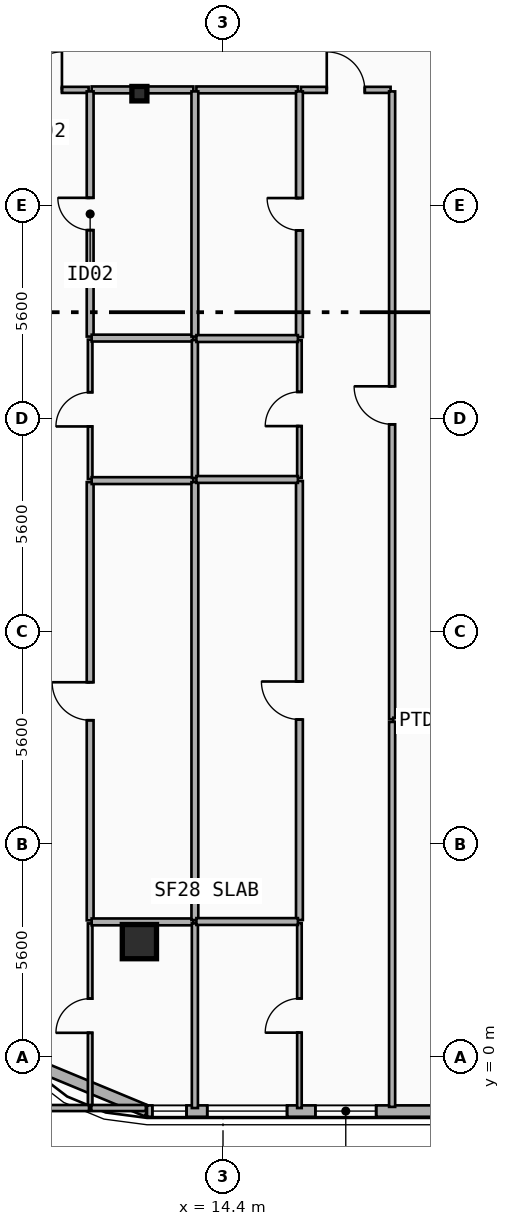
"""IFC4 building model, lengths in metres.
Left out: names, types, materials, properties, quantities, classifications, styles, units other than length and angle.
Written with IfcOpenShell. Run it as: python <this file> out.ifc"""

import sys

from ifc_helpers import new_model, si_unit, direction, frame, frame_2d, origin, origin_2d, place, context, subcontext, project, spatial, rectangle, i_section, extrude, element, fill, save


model = new_model("IFC4")
c1 = context("Model", 3, precision=1e-05, world=origin(), true_north=direction((0.0, 1.0)))
c2 = subcontext(c1, "Body", "Model", "MODEL_VIEW")
j1 = project(units=[si_unit("LENGTHUNIT", "METRE"), si_unit("PLANEANGLEUNIT", "RADIAN")], contexts=[c1])
p1 = place(None, origin())
s1 = spatial("IfcSite", under=j1, at=p1, CompositionType="ELEMENT")
p2 = place(p1, origin())
s2 = spatial("IfcBuilding", under=s1, at=p2, CompositionType="ELEMENT")
p3 = place(p2, frame((0.0, 0.0, 254.7)))
s3 = spatial("IfcBuildingStorey", under=s2, at=p3, CompositionType="ELEMENT", Elevation=254.7)
p4 = place(p3, frame((12.2, 25.35, 0.0), z_axis=(0.0, 0.0, 1.0), x_axis=(1.0, 0.0, 0.0)))
e1 = element("IfcColumn", 1, at=p4, inside=s3, PredefinedType="COLUMN", context=c2, shape_type="SweptSolid", body=[
    extrude(i_section(OverallWidth=0.395, OverallDepth=0.38, WebThickness=0.019, FlangeThickness=0.03, FilletRadius=0.015, at=origin_2d()), origin(), (0.0, 0.0, 1.0), 3.7),
])
p5 = place(p3, frame((12.2, 3.147, 0.0), z_axis=(0.0, -0.090292812226, 0.995915261486), x_axis=(1.0, 0.0, 0.0)))
e2 = element("IfcColumn", 2, at=p5, inside=s3, PredefinedType="COLUMN", context=c2, shape_type="SweptSolid", body=[
    extrude(rectangle(XDim=0.9, YDim=0.9, at=origin_2d()), origin(), (0.0, 0.0, 1.0), 3.715),
])
p6 = place(p3, frame((12.4, -1.42, 0.0), z_axis=(0.0, 0.0, 1.0), x_axis=(-0.92389884758, 0.382636798336, 0.0)))
e3 = element("IfcWall", 3, at=p6, inside=s3, PredefinedType="SOLIDWALL", context=c2, shape_type="SweptSolid", body=[
    extrude(rectangle(XDim=3.077, YDim=0.3, at=frame_2d((1.538, 0.0))), origin(), (0.0, 0.0, 1.0), 3.42),
])
p7 = place(p3, frame((45.2, -1.42, 0.0), z_axis=(0.0, 0.0, 1.0), x_axis=(-1.0, 0.0, 0.0)))
e4 = element("IfcWall", 4, at=p7, inside=s3, PredefinedType="SOLIDWALL", context=c2, shape_type="SweptSolid", body=[
    extrude(rectangle(XDim=32.8, YDim=0.3, at=frame_2d((16.4, 0.0))), origin(), (0.0, 0.0, 1.0), 3.42),
])
p8 = place(p7, frame((26.77, 0.0, 0.75)))
e5 = element("IfcOpeningElement", 5, at=p8, cuts=e4, PredefinedType="OPENING", context=c2, shape_type="SweptSolid", body=[
    extrude(rectangle(XDim=1.6, YDim=1.95, at=frame_2d((0.8, 0.975))), frame((0.0, 0.16, 0.0), z_axis=(0.0, -1.0, 0.0), x_axis=(1.0, 0.0, 0.0)), (0.0, 0.0, 1.0), 0.32),
])
p9 = place(p7, frame((29.115, 0.0, 0.75)))
e6 = element("IfcOpeningElement", 6, at=p9, cuts=e4, PredefinedType="OPENING", context=c2, shape_type="SweptSolid", body=[
    extrude(rectangle(XDim=2.1, YDim=2.1, at=frame_2d((1.05, 1.05))), frame((0.0, 0.16, 0.0), z_axis=(0.0, -1.0, 0.0), x_axis=(1.0, 0.0, 0.0)), (0.0, 0.0, 1.0), 0.32),
])
p10 = place(p7, frame((15.75, 0.0, 0.75)))
e7 = element("IfcOpeningElement", 7, at=p10, cuts=e4, PredefinedType="OPENING", context=c2, shape_type="SweptSolid", body=[
    extrude(rectangle(XDim=2.1, YDim=2.1, at=frame_2d((1.05, 1.05))), frame((0.0, 0.16, 0.0), z_axis=(0.0, -1.0, 0.0), x_axis=(1.0, 0.0, 0.0)), (0.0, 0.0, 1.0), 0.32),
])
p11 = place(p7, frame((4.681, 0.0, 0.8)))
e8 = element("IfcOpeningElement", 8, at=p11, cuts=e4, PredefinedType="OPENING", context=c2, shape_type="SweptSolid", body=[
    extrude(rectangle(XDim=1.8, YDim=1.8, at=frame_2d((0.9, 0.9))), frame((0.0, 0.16, 0.0), z_axis=(0.0, -1.0, 0.0), x_axis=(1.0, 0.0, 0.0)), (0.0, 0.0, 1.0), 0.32),
])
p12 = place(p7, frame((1.831, 0.0, 0.75)))
e9 = element("IfcOpeningElement", 9, at=p12, cuts=e4, PredefinedType="OPENING", context=c2, shape_type="SweptSolid", body=[
    extrude(rectangle(XDim=2.1, YDim=2.1, at=frame_2d((1.05, 1.05))), frame((0.0, 0.16, 0.0), z_axis=(0.0, -1.0, 0.0), x_axis=(1.0, 0.0, 0.0)), (0.0, 0.0, 1.0), 0.32),
])
p13 = place(p7, frame((0.2, 0.0, 0.9)))
e10 = element("IfcOpeningElement", 10, at=p13, cuts=e4, PredefinedType="OPENING", context=c2, shape_type="SweptSolid", body=[
    extrude(rectangle(XDim=0.9, YDim=1.05, at=frame_2d((0.45, 0.525))), frame((0.0, 0.16, 0.0), z_axis=(0.0, -1.0, 0.0), x_axis=(1.0, 0.0, 0.0)), (0.0, 0.0, 1.0), 0.32),
])
p14 = place(p7, frame((31.76, 0.0, 0.9)))
e11 = element("IfcOpeningElement", 11, at=p14, cuts=e4, PredefinedType="OPENING", context=c2, shape_type="SweptSolid", body=[
    extrude(rectangle(XDim=0.9, YDim=1.05, at=frame_2d((0.45, 0.525))), frame((0.0, 0.16, 0.0), z_axis=(0.0, -1.0, 0.0), x_axis=(1.0, 0.0, 0.0)), (0.0, 0.0, 1.0), 0.32),
])
p15 = place(p3, frame((8.46, 25.45, 0.0), z_axis=(0.0, 0.0, 1.0), x_axis=(1.0, 0.0, 0.0)))
e12 = element("IfcWall", 12, at=p15, inside=s3, PredefinedType="PARTITIONING", context=c2, shape_type="SweptSolid", body=[
    extrude(rectangle(XDim=2.404, YDim=0.16, at=frame_2d((1.202, 0.0))), origin(), (0.0, 0.0, 1.0), 3.42),
])
p16 = place(p15, frame((0.702, 0.0, 0.0)))
e13 = element("IfcOpeningElement", 13, at=p16, cuts=e12, PredefinedType="OPENING", context=c2, shape_type="SweptSolid", body=[
    extrude(rectangle(XDim=1.0, YDim=2.15, at=frame_2d((0.5, 1.075))), frame((0.0, 0.09, 0.0), z_axis=(0.0, -1.0, 0.0), x_axis=(1.0, 0.0, 0.0)), (0.0, 0.0, 1.0), 0.18),
])
p17 = place(p3, frame((10.944, 25.45, 0.0), z_axis=(0.0, 0.0, 1.0), x_axis=(1.0, 0.0, 0.0)))
e14 = element("IfcWall", 14, at=p17, inside=s3, PredefinedType="PLUMBINGWALL", context=c2, shape_type="SweptSolid", body=[
    extrude(rectangle(XDim=2.676, YDim=0.18, at=frame_2d((1.338, 0.0))), origin(), (0.0, 0.0, 1.0), 2.7),
])
p18 = place(p3, frame((16.451, 25.45, 0.0), z_axis=(0.0, 0.0, 1.0), x_axis=(1.0, 0.0, 0.0)))
e15 = element("IfcWall", 15, at=p18, inside=s3, PredefinedType="PARTITIONING", context=c2, shape_type="SweptSolid", body=[
    extrude(rectangle(XDim=2.359, YDim=0.16, at=frame_2d((1.18, 0.0))), origin(), (0.0, 0.0, 1.0), 3.42),
])
p19 = place(p18, frame((0.679, 0.0, 0.0)))
e16 = element("IfcOpeningElement", 16, at=p19, cuts=e15, PredefinedType="OPENING", context=c2, shape_type="SweptSolid", body=[
    extrude(rectangle(XDim=1.0, YDim=2.15, at=frame_2d((0.5, 1.075))), frame((0.0, 0.09, 0.0), z_axis=(0.0, -1.0, 0.0), x_axis=(1.0, 0.0, 0.0)), (0.0, 0.0, 1.0), 0.18),
])
p20 = place(p3, frame((13.7, 25.45, 0.0), z_axis=(0.0, 0.0, 1.0), x_axis=(1.0, 0.0, 0.0)))
e17 = element("IfcWall", 17, at=p20, inside=s3, PredefinedType="PLUMBINGWALL", context=c2, shape_type="SweptSolid", body=[
    extrude(rectangle(XDim=2.671, YDim=0.18, at=frame_2d((1.335, 0.0))), origin(), (0.0, 0.0, 1.0), 3.42),
])
p21 = place(p3, frame((18.85, 8.89, 0.0), z_axis=(0.0, 0.0, 1.0), x_axis=(0.0, 1.0, 0.0)))
e18 = element("IfcWall", 18, at=p21, inside=s3, PredefinedType="PARTITIONING", context=c2, shape_type="SweptSolid", body=[
    extrude(rectangle(XDim=16.52, YDim=0.16, at=frame_2d((8.26, 0.0))), origin(), (0.0, 0.0, 1.0), 2.9),
])
p22 = place(p21, frame((7.76, 0.0, 0.0)))
e19 = element("IfcOpeningElement", 19, at=p22, cuts=e18, PredefinedType="OPENING", context=c2, shape_type="SweptSolid", body=[
    extrude(rectangle(XDim=1.0, YDim=2.15, at=frame_2d((0.5, 1.075))), frame((0.0, 0.09, 0.0), z_axis=(0.0, -1.0, 0.0), x_axis=(1.0, 0.0, 0.0)), (0.0, 0.0, 1.0), 0.18),
])
p23 = place(p3, frame((10.904, -1.34, 0.0), z_axis=(0.0, 0.0, 1.0), x_axis=(0.0, 1.0, 0.0)))
e20 = element("IfcWall", 20, at=p23, inside=s3, PredefinedType="PARTITIONING", context=c2, shape_type="SweptSolid", body=[
    extrude(rectangle(XDim=4.858, YDim=0.12, at=frame_2d((2.429, 0.0))), origin(), (0.0, 0.0, 1.0), 3.42),
])
p24 = place(p23, frame((1.979, 0.0, 0.0)))
e21 = element("IfcOpeningElement", 21, at=p24, cuts=e20, PredefinedType="OPENING", context=c2, shape_type="SweptSolid", body=[
    extrude(rectangle(XDim=0.9, YDim=2.1, at=frame_2d((0.45, 1.05))), frame((0.0, 0.07, 0.0), z_axis=(0.0, -1.0, 0.0), x_axis=(1.0, 0.0, 0.0)), (0.0, 0.0, 1.0), 0.14),
])
p25 = place(p3, frame((10.904, 3.598, 0.0), z_axis=(0.0, 0.0, 1.0), x_axis=(0.0, 1.0, 0.0)))
e22 = element("IfcWall", 22, at=p25, inside=s3, PredefinedType="PLUMBINGWALL", context=c2, shape_type="SweptSolid", body=[
    extrude(rectangle(XDim=11.531, YDim=0.18, at=frame_2d((5.766, 0.0))), origin(), (0.0, 0.0, 1.0), 3.42),
])
p26 = place(p25, frame((5.265, 0.0, 0.0)))
e23 = element("IfcOpeningElement", 23, at=p26, cuts=e22, PredefinedType="OPENING", context=c2, shape_type="SweptSolid", body=[
    extrude(rectangle(XDim=1.0, YDim=2.15, at=frame_2d((0.5, 1.075))), frame((0.0, 0.1, 0.0), z_axis=(0.0, -1.0, 0.0), x_axis=(1.0, 0.0, 0.0)), (0.0, 0.0, 1.0), 0.2),
])
p27 = place(p3, frame((10.904, 15.209, 0.0), z_axis=(0.0, 0.0, 1.0), x_axis=(0.0, 1.0, 0.0)))
e24 = element("IfcWall", 24, at=p27, inside=s3, PredefinedType="PARTITIONING", context=c2, shape_type="SweptSolid", body=[
    extrude(rectangle(XDim=3.67, YDim=0.12, at=frame_2d((1.835, 0.0))), origin(), (0.0, 0.0, 1.0), 3.42),
])
p28 = place(p27, frame((1.385, 0.0, 0.0)))
e25 = element("IfcOpeningElement", 25, at=p28, cuts=e24, PredefinedType="OPENING", context=c2, shape_type="SweptSolid", body=[
    extrude(rectangle(XDim=0.9, YDim=2.1, at=frame_2d((0.45, 1.05))), frame((0.0, 0.07, 0.0), z_axis=(0.0, -1.0, 0.0), x_axis=(1.0, 0.0, 0.0)), (0.0, 0.0, 1.0), 0.14),
])
p29 = place(p3, frame((10.904, 18.959, 0.0), z_axis=(0.0, 0.0, 1.0), x_axis=(0.0, 1.0, 0.0)))
e26 = element("IfcWall", 26, at=p29, inside=s3, PredefinedType="PLUMBINGWALL", context=c2, shape_type="SweptSolid", body=[
    extrude(rectangle(XDim=6.451, YDim=0.18, at=frame_2d((3.226, 0.0))), origin(), (0.0, 0.0, 1.0), 2.9),
])
p30 = place(p29, frame((2.801, 0.0, 0.0)))
e27 = element("IfcOpeningElement", 27, at=p30, cuts=e26, PredefinedType="OPENING", context=c2, shape_type="SweptSolid", body=[
    extrude(rectangle(XDim=0.85, YDim=2.1, at=frame_2d((0.425, 1.05))), frame((0.0, 0.1, 0.0), z_axis=(0.0, -1.0, 0.0), x_axis=(1.0, 0.0, 0.0)), (0.0, 0.0, 1.0), 0.2),
])
p31 = place(p3, frame((10.944, 3.558, 0.0), z_axis=(0.0, 0.0, 1.0), x_axis=(1.0, 0.0, 0.0)))
e28 = element("IfcWall", 28, at=p31, inside=s3, PredefinedType="PLUMBINGWALL", context=c2, shape_type="SweptSolid", body=[
    extrude(rectangle(XDim=2.676, YDim=0.18, at=frame_2d((1.338, 0.0))), origin(), (0.0, 0.0, 1.0), 2.7),
])
p32 = place(p3, frame((13.66, -1.34, 0.0), z_axis=(0.0, 0.0, 1.0), x_axis=(0.0, 1.0, 0.0)))
e29 = element("IfcWall", 29, at=p32, inside=s3, PredefinedType="PARTITIONING", context=c2, shape_type="SweptSolid", body=[
    extrude(rectangle(XDim=4.858, YDim=0.16, at=frame_2d((2.429, 0.0))), origin(), (0.0, 0.0, 1.0), 3.08),
])
p33 = place(p3, frame((10.944, 15.169, 0.0), z_axis=(0.0, 0.0, 1.0), x_axis=(1.0, 0.0, 0.0)))
e30 = element("IfcWall", 30, at=p33, inside=s3, PredefinedType="PLUMBINGWALL", context=c2, shape_type="SweptSolid", body=[
    extrude(rectangle(XDim=2.676, YDim=0.18, at=frame_2d((1.338, 0.0))), origin(), (0.0, 0.0, 1.0), 2.7),
])
p34 = place(p3, frame((13.66, 3.607, 0.0), z_axis=(0.0, 0.0, 1.0), x_axis=(0.0, 1.0, 0.0)))
e31 = element("IfcWall", 31, at=p34, inside=s3, PredefinedType="PLUMBINGWALL", context=c2, shape_type="SweptSolid", body=[
    extrude(rectangle(XDim=11.522, YDim=0.18, at=frame_2d((5.761, 0.0))), origin(), (0.0, 0.0, 1.0), 2.9),
])
p35 = place(p3, frame((10.944, 18.919, 0.0), z_axis=(0.0, 0.0, 1.0), x_axis=(1.0, 0.0, 0.0)))
e32 = element("IfcWall", 32, at=p35, inside=s3, PredefinedType="PLUMBINGWALL", context=c2, shape_type="SweptSolid", body=[
    extrude(rectangle(XDim=2.676, YDim=0.18, at=frame_2d((1.338, 0.0))), origin(), (0.0, 0.0, 1.0), 2.7),
])
p36 = place(p3, frame((13.66, 15.239, 0.0), z_axis=(0.0, 0.0, 1.0), x_axis=(0.0, 1.0, 0.0)))
e33 = element("IfcWall", 33, at=p36, inside=s3, PredefinedType="PARTITIONING", context=c2, shape_type="SweptSolid", body=[
    extrude(rectangle(XDim=3.628, YDim=0.16, at=frame_2d((1.814, 0.0))), origin(), (0.0, 0.0, 1.0), 2.9),
])
p37 = place(p3, frame((13.66, 18.959, 0.0), z_axis=(0.0, 0.0, 1.0), x_axis=(0.0, 1.0, 0.0)))
e34 = element("IfcWall", 34, at=p37, inside=s3, PredefinedType="PLUMBINGWALL", context=c2, shape_type="SweptSolid", body=[
    extrude(rectangle(XDim=6.451, YDim=0.18, at=frame_2d((3.226, 0.0))), origin(), (0.0, 0.0, 1.0), 2.9),
])
p38 = place(p3, frame((16.411, -1.34, 0.0), z_axis=(0.0, 0.0, 1.0), x_axis=(0.0, 1.0, 0.0)))
e35 = element("IfcWall", 35, at=p38, inside=s3, PredefinedType="PARTITIONING", context=c2, shape_type="SweptSolid", body=[
    extrude(rectangle(XDim=4.867, YDim=0.12, at=frame_2d((2.434, 0.0))), origin(), (0.0, 0.0, 1.0), 3.08),
])
p39 = place(p38, frame((1.983, 0.0, 0.0)))
e36 = element("IfcOpeningElement", 36, at=p39, cuts=e35, PredefinedType="OPENING", context=c2, shape_type="SweptSolid", body=[
    extrude(rectangle(XDim=0.9, YDim=2.1, at=frame_2d((0.45, 1.05))), frame((0.0, 0.07, 0.0), z_axis=(0.0, -1.0, 0.0), x_axis=(1.0, 0.0, 0.0)), (0.0, 0.0, 1.0), 0.14),
])
p40 = place(p3, frame((16.411, 3.607, 0.0), z_axis=(0.0, 0.0, 1.0), x_axis=(0.0, 1.0, 0.0)))
e37 = element("IfcWall", 37, at=p40, inside=s3, PredefinedType="PLUMBINGWALL", context=c2, shape_type="SweptSolid", body=[
    extrude(rectangle(XDim=11.552, YDim=0.18, at=frame_2d((5.776, 0.0))), origin(), (0.0, 0.0, 1.0), 2.9),
])
p41 = place(p40, frame((5.276, 0.0, 0.0)))
e38 = element("IfcOpeningElement", 38, at=p41, cuts=e37, PredefinedType="OPENING", context=c2, shape_type="SweptSolid", body=[
    extrude(rectangle(XDim=1.0, YDim=2.15, at=frame_2d((0.5, 1.075))), frame((0.0, 0.1, 0.0), z_axis=(0.0, -1.0, 0.0), x_axis=(1.0, 0.0, 0.0)), (0.0, 0.0, 1.0), 0.2),
])
p42 = place(p3, frame((16.411, 15.239, 0.0), z_axis=(0.0, 0.0, 1.0), x_axis=(0.0, 1.0, 0.0)))
e39 = element("IfcWall", 39, at=p42, inside=s3, PredefinedType="PARTITIONING", context=c2, shape_type="SweptSolid", body=[
    extrude(rectangle(XDim=3.628, YDim=0.12, at=frame_2d((1.814, 0.0))), origin(), (0.0, 0.0, 1.0), 2.9),
])
p43 = place(p42, frame((1.364, 0.0, 0.0)))
e40 = element("IfcOpeningElement", 40, at=p43, cuts=e39, PredefinedType="OPENING", context=c2, shape_type="SweptSolid", body=[
    extrude(rectangle(XDim=0.9, YDim=2.1, at=frame_2d((0.45, 1.05))), frame((0.0, 0.07, 0.0), z_axis=(0.0, -1.0, 0.0), x_axis=(1.0, 0.0, 0.0)), (0.0, 0.0, 1.0), 0.14),
])
p44 = place(p3, frame((16.411, 18.947, 0.0), z_axis=(0.0, 0.0, 1.0), x_axis=(0.0, 1.0, 0.0)))
e41 = element("IfcWall", 41, at=p44, inside=s3, PredefinedType="PLUMBINGWALL", context=c2, shape_type="SweptSolid", body=[
    extrude(rectangle(XDim=6.463, YDim=0.18, at=frame_2d((3.231, 0.0))), origin(), (0.0, 0.0, 1.0), 2.9),
])
p45 = place(p44, frame((2.806, 0.0, 0.0)))
e42 = element("IfcOpeningElement", 42, at=p45, cuts=e41, PredefinedType="OPENING", context=c2, shape_type="SweptSolid", body=[
    extrude(rectangle(XDim=0.85, YDim=2.1, at=frame_2d((0.425, 1.05))), frame((0.0, 0.1, 0.0), z_axis=(0.0, -1.0, 0.0), x_axis=(1.0, 0.0, 0.0)), (0.0, 0.0, 1.0), 0.2),
])
p46 = place(p3, frame((13.7, 3.567, 0.0), z_axis=(0.0, 0.0, 1.0), x_axis=(1.0, 0.0, 0.0)))
e43 = element("IfcWall", 43, at=p46, inside=s3, PredefinedType="PLUMBINGWALL", context=c2, shape_type="SweptSolid", body=[
    extrude(rectangle(XDim=2.671, YDim=0.18, at=frame_2d((1.335, 0.0))), origin(), (0.0, 0.0, 1.0), 3.42),
])
p47 = place(p3, frame((13.7, 15.199, 0.0), z_axis=(0.0, 0.0, 1.0), x_axis=(1.0, 0.0, 0.0)))
e44 = element("IfcWall", 44, at=p47, inside=s3, PredefinedType="PLUMBINGWALL", context=c2, shape_type="SweptSolid", body=[
    extrude(rectangle(XDim=2.671, YDim=0.18, at=frame_2d((1.335, 0.0))), origin(), (0.0, 0.0, 1.0), 2.9),
])
p48 = place(p3, frame((13.7, 18.907, 0.0), z_axis=(0.0, 0.0, 1.0), x_axis=(1.0, 0.0, 0.0)))
e45 = element("IfcWall", 45, at=p48, inside=s3, PredefinedType="PLUMBINGWALL", context=c2, shape_type="SweptSolid", body=[
    extrude(rectangle(XDim=2.671, YDim=0.18, at=frame_2d((1.335, 0.0))), origin(), (0.0, 0.0, 1.0), 2.91),
])
p49 = place(p3, frame((18.88, 8.85, 0.0), z_axis=(0.0, 0.0, 1.0), x_axis=(1.0, 0.0, 0.0)))
e46 = element("IfcWall", 46, at=p49, inside=s3, PredefinedType="PARTITIONING", context=c2, shape_type="SweptSolid", body=[
    extrude(rectangle(XDim=1.54, YDim=0.16, at=frame_2d((0.77, 0.0))), origin(), (0.0, 0.0, 1.0), 3.42),
])
p50 = place(p3, frame((8.49, -1.34, 0.0), z_axis=(0.0, 0.0, 1.0), x_axis=(1.0, 0.0, 0.0)))
e47 = element("IfcWall", 47, at=p50, inside=s3, PredefinedType="PARTITIONING", context=c2, shape_type="SweptSolid", body=[
    extrude(rectangle(XDim=2.384, YDim=0.16, at=frame_2d((1.192, 0.0))), origin(), (0.0, 0.0, 1.0), 3.42),
])
p51 = place(p3, frame((10.934, -1.34, 0.0), z_axis=(0.0, 0.0, 1.0), x_axis=(1.0, 0.0, 0.0)))
e48 = element("IfcWall", 48, at=p51, inside=s3, PredefinedType="PARTITIONING", context=c2, shape_type="SweptSolid", body=[
    extrude(rectangle(XDim=1.436, YDim=0.16, at=frame_2d((0.718, 0.0))), origin(), (0.0, 0.0, 1.0), 3.42),
])
p52 = place(p3, frame((18.85, -1.31, 0.0), z_axis=(0.0, 0.0, 1.0), x_axis=(0.0, 1.0, 0.0)))
e49 = element("IfcWall", 49, at=p52, inside=s3, PredefinedType="PARTITIONING", context=c2, shape_type="SweptSolid", body=[
    extrude(rectangle(XDim=10.13, YDim=0.16, at=frame_2d((5.065, 0.0))), origin(), (0.0, 0.0, 1.0), 2.9),
])
p53 = place(p8, origin())
e50 = element("IfcWindow", 50, at=p53, inside=s3, PartitioningType="SINGLE_PANEL", PredefinedType="WINDOW", context=c2, shape_type="SweptSolid", body=[
    extrude(rectangle(XDim=1.6, YDim=1.95, at=frame_2d((0.8, 0.975))), frame((0.0, 0.03, 0.0), z_axis=(0.0, -1.0, 0.0), x_axis=(1.0, 0.0, 0.0)), (0.0, 0.0, 1.0), 0.06),
])
fill(e5, e50)
p54 = place(p9, origin())
e51 = element("IfcWindow", 51, at=p54, inside=s3, PartitioningType="SINGLE_PANEL", PredefinedType="WINDOW", context=c2, shape_type="SweptSolid", body=[
    extrude(rectangle(XDim=2.1, YDim=2.1, at=frame_2d((1.05, 1.05))), frame((0.0, 0.03, 0.0), z_axis=(0.0, -1.0, 0.0), x_axis=(1.0, 0.0, 0.0)), (0.0, 0.0, 1.0), 0.06),
])
fill(e6, e51)
p55 = place(p14, origin())
e52 = element("IfcWindow", 52, at=p55, inside=s3, PartitioningType="SINGLE_PANEL", PredefinedType="WINDOW", context=c2, shape_type="SweptSolid", body=[
    extrude(rectangle(XDim=0.9, YDim=1.05, at=frame_2d((0.45, 0.525))), frame((0.0, 0.03, 0.0), z_axis=(0.0, -1.0, 0.0), x_axis=(1.0, 0.0, 0.0)), (0.0, 0.0, 1.0), 0.06),
])
fill(e11, e52)
p56 = place(p16, origin())
e53 = element("IfcDoor", 53, at=p56, inside=s3, OperationType="SINGLE_SWING_RIGHT", PredefinedType="DOOR", context=c2, shape_type="SweptSolid", body=[
    extrude(rectangle(XDim=1.0, YDim=2.15, at=frame_2d((0.5, 1.075))), frame((0.0, 0.025, 0.0), z_axis=(0.0, -1.0, 0.0), x_axis=(1.0, 0.0, 0.0)), (0.0, 0.0, 1.0), 0.05),
])
fill(e13, e53)
p57 = place(p19, origin())
e54 = element("IfcDoor", 54, at=p57, inside=s3, OperationType="SINGLE_SWING_LEFT", PredefinedType="DOOR", context=c2, shape_type="SweptSolid", body=[
    extrude(rectangle(XDim=1.0, YDim=2.15, at=frame_2d((0.5, 1.075))), frame((0.0, 0.025, 0.0), z_axis=(0.0, -1.0, 0.0), x_axis=(1.0, 0.0, 0.0)), (0.0, 0.0, 1.0), 0.05),
])
fill(e16, e54)
p58 = place(p22, origin())
e55 = element("IfcDoor", 55, at=p58, inside=s3, OperationType="SINGLE_SWING_RIGHT", PredefinedType="DOOR", context=c2, shape_type="SweptSolid", body=[
    extrude(rectangle(XDim=1.0, YDim=2.15, at=frame_2d((0.5, 1.075))), frame((0.0, 0.025, 0.0), z_axis=(0.0, -1.0, 0.0), x_axis=(1.0, 0.0, 0.0)), (0.0, 0.0, 1.0), 0.05),
])
fill(e19, e55)
p59 = place(p24, origin())
e56 = element("IfcDoor", 56, at=p59, inside=s3, OperationType="SINGLE_SWING_LEFT", PredefinedType="DOOR", context=c2, shape_type="SweptSolid", body=[
    extrude(rectangle(XDim=0.9, YDim=2.1, at=frame_2d((0.45, 1.05))), frame((0.0, 0.025, 0.0), z_axis=(0.0, -1.0, 0.0), x_axis=(1.0, 0.0, 0.0)), (0.0, 0.0, 1.0), 0.05),
])
fill(e21, e56)
p60 = place(p26, origin())
e57 = element("IfcDoor", 57, at=p60, inside=s3, OperationType="SINGLE_SWING_RIGHT", PredefinedType="DOOR", context=c2, shape_type="SweptSolid", body=[
    extrude(rectangle(XDim=1.0, YDim=2.15, at=frame_2d((0.5, 1.075))), frame((0.0, 0.025, 0.0), z_axis=(0.0, -1.0, 0.0), x_axis=(1.0, 0.0, 0.0)), (0.0, 0.0, 1.0), 0.05),
])
fill(e23, e57)
p61 = place(p28, origin())
e58 = element("IfcDoor", 58, at=p61, inside=s3, OperationType="SINGLE_SWING_LEFT", PredefinedType="DOOR", context=c2, shape_type="SweptSolid", body=[
    extrude(rectangle(XDim=0.9, YDim=2.1, at=frame_2d((0.45, 1.05))), frame((0.0, 0.025, 0.0), z_axis=(0.0, -1.0, 0.0), x_axis=(1.0, 0.0, 0.0)), (0.0, 0.0, 1.0), 0.05),
])
fill(e25, e58)
p62 = place(p30, origin())
e59 = element("IfcDoor", 59, at=p62, inside=s3, OperationType="SINGLE_SWING_RIGHT", PredefinedType="DOOR", context=c2, shape_type="SweptSolid", body=[
    extrude(rectangle(XDim=0.85, YDim=2.1, at=frame_2d((0.425, 1.05))), frame((0.0, 0.025, 0.0), z_axis=(0.0, -1.0, 0.0), x_axis=(1.0, 0.0, 0.0)), (0.0, 0.0, 1.0), 0.05),
])
fill(e27, e59)
p63 = place(p39, origin())
e60 = element("IfcDoor", 60, at=p63, inside=s3, OperationType="SINGLE_SWING_LEFT", PredefinedType="DOOR", context=c2, shape_type="SweptSolid", body=[
    extrude(rectangle(XDim=0.9, YDim=2.1, at=frame_2d((0.45, 1.05))), frame((0.0, 0.025, 0.0), z_axis=(0.0, -1.0, 0.0), x_axis=(1.0, 0.0, 0.0)), (0.0, 0.0, 1.0), 0.05),
])
fill(e36, e60)
p64 = place(p41, origin())
e61 = element("IfcDoor", 61, at=p64, inside=s3, OperationType="SINGLE_SWING_RIGHT", PredefinedType="DOOR", context=c2, shape_type="SweptSolid", body=[
    extrude(rectangle(XDim=1.0, YDim=2.15, at=frame_2d((0.5, 1.075))), frame((0.0, 0.025, 0.0), z_axis=(0.0, -1.0, 0.0), x_axis=(1.0, 0.0, 0.0)), (0.0, 0.0, 1.0), 0.05),
])
fill(e38, e61)
p65 = place(p43, origin())
e62 = element("IfcDoor", 62, at=p65, inside=s3, OperationType="SINGLE_SWING_LEFT", PredefinedType="DOOR", context=c2, shape_type="SweptSolid", body=[
    extrude(rectangle(XDim=0.9, YDim=2.1, at=frame_2d((0.45, 1.05))), frame((0.0, 0.025, 0.0), z_axis=(0.0, -1.0, 0.0), x_axis=(1.0, 0.0, 0.0)), (0.0, 0.0, 1.0), 0.05),
])
fill(e40, e62)
p66 = place(p45, origin())
e63 = element("IfcDoor", 63, at=p66, inside=s3, OperationType="SINGLE_SWING_RIGHT", PredefinedType="DOOR", context=c2, shape_type="SweptSolid", body=[
    extrude(rectangle(XDim=0.85, YDim=2.1, at=frame_2d((0.425, 1.05))), frame((0.0, 0.025, 0.0), z_axis=(0.0, -1.0, 0.0), x_axis=(1.0, 0.0, 0.0)), (0.0, 0.0, 1.0), 0.05),
])
fill(e42, e63)
save(model, sys.argv[1])
